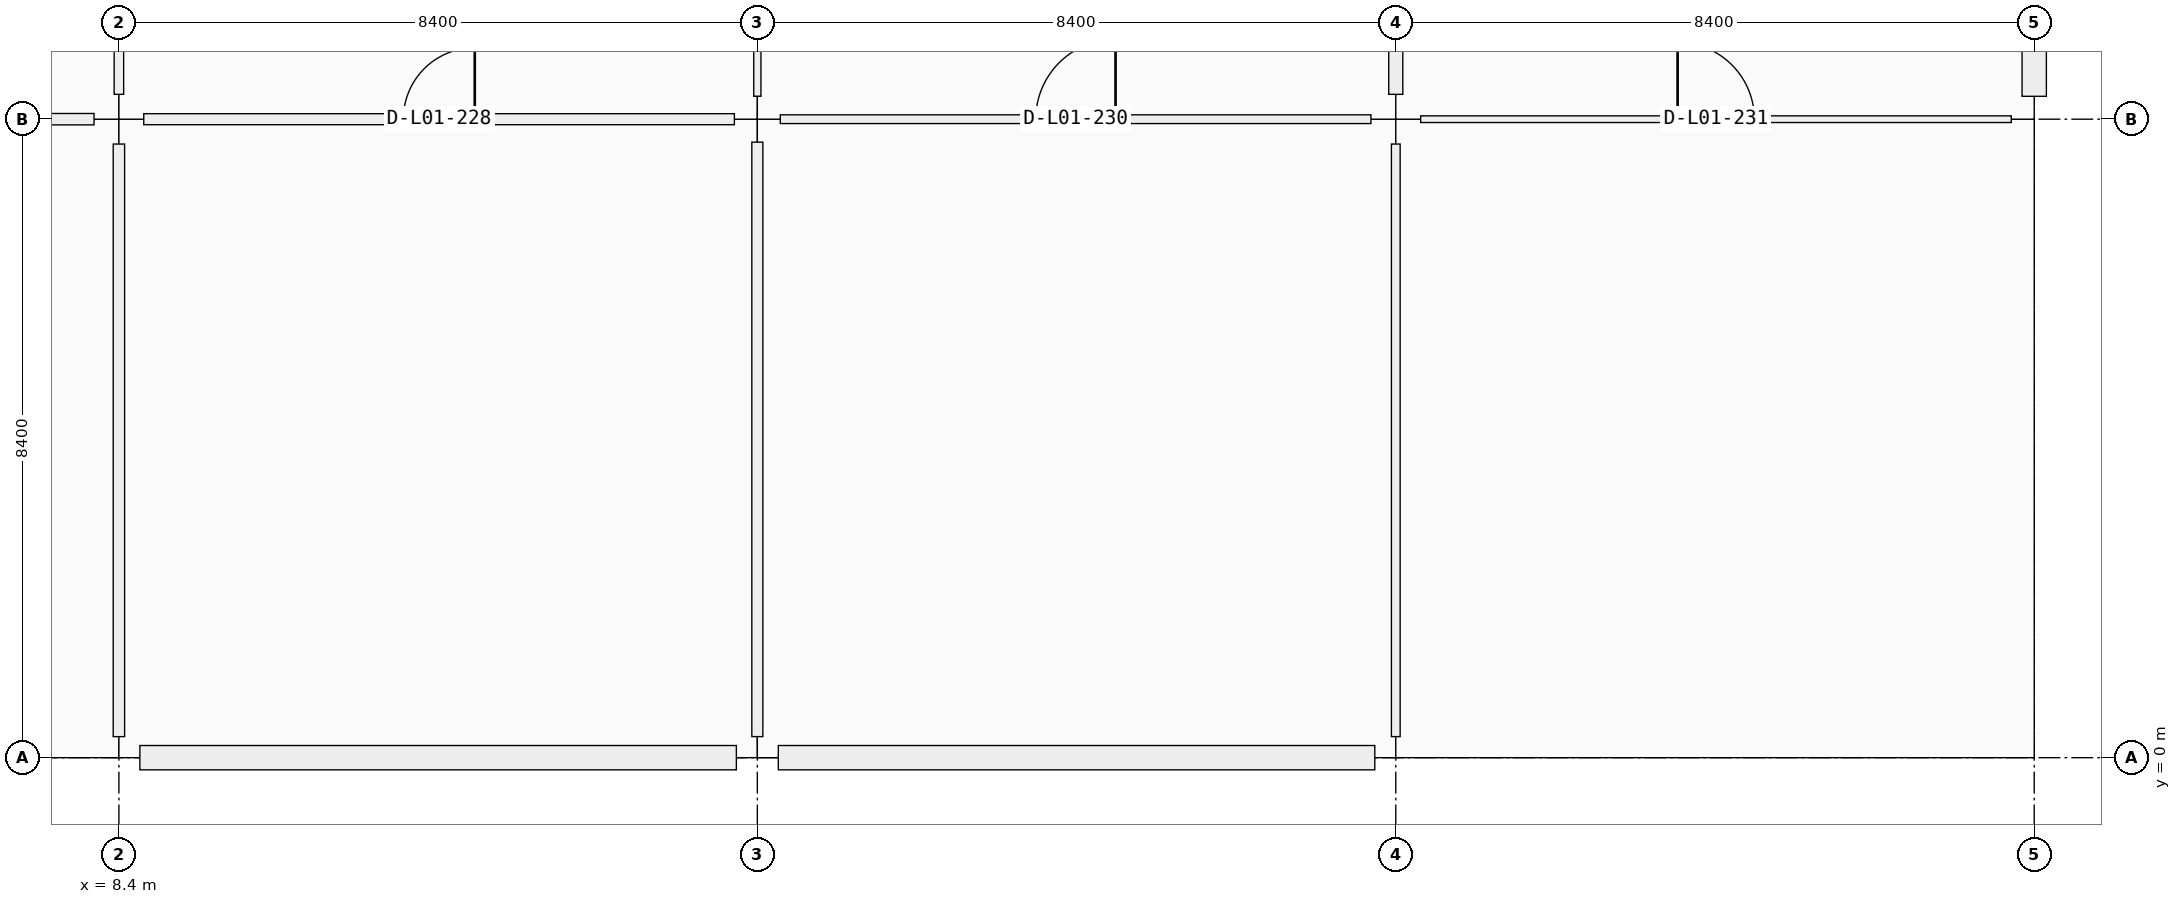
"""IFC4 building model, lengths in metres.
Left out: names, types, materials, properties, quantities, classifications, styles, units other than length and angle.
Written with IfcOpenShell. Run it as: python <this file> out.ifc"""

import sys

from ifc_helpers import new_model, si_unit, direction, frame, frame_2d, origin, origin_2d, place, context, subcontext, project, spatial, rectangle, extrude, element, fill, save


model = new_model("IFC4")
c1 = context("Model", 3, precision=1e-05, world=origin(), true_north=direction((0.0, 1.0)))
c2 = subcontext(c1, "Body", "Model", "MODEL_VIEW")
j1 = project(units=[si_unit("LENGTHUNIT", "METRE"), si_unit("PLANEANGLEUNIT", "RADIAN")], contexts=[c1])
p1 = place(None, origin())
s1 = spatial("IfcSite", under=j1, at=p1, CompositionType="ELEMENT")
p2 = place(p1, origin())
s2 = spatial("IfcBuilding", under=s1, at=p2, CompositionType="ELEMENT")
p3 = place(p2, frame((0.0, 0.0, 5.76)))
s3 = spatial("IfcBuildingStorey", under=s2, at=p3, CompositionType="ELEMENT", Elevation=5.76)
p4 = place(p3, frame((8.4, 0.0, 0.0), z_axis=(0.0, 0.0, 1.0), x_axis=(1.0, 0.0, 0.0)))
e1 = element("IfcColumn", 1, at=p4, inside=s3, PredefinedType="COLUMN", context=c2, shape_type="SweptSolid", body=[
    extrude(rectangle(XDim=0.55, YDim=0.55, at=origin_2d()), origin(), (0.0, 0.0, 1.0), 4.2),
])
p5 = place(p3, frame((8.4, 8.4, 0.0), z_axis=(0.0, 0.0, 1.0), x_axis=(1.0, 0.0, 0.0)))
e2 = element("IfcColumn", 2, at=p5, inside=s3, PredefinedType="COLUMN", context=c2, shape_type="SweptSolid", body=[
    extrude(rectangle(XDim=0.65, YDim=0.65, at=origin_2d()), origin(), (0.0, 0.0, 1.0), 4.5),
])
p6 = place(p3, frame((16.8, 0.0, 0.0), z_axis=(0.0, 0.0, 1.0), x_axis=(1.0, 0.0, 0.0)))
e3 = element("IfcColumn", 3, at=p6, inside=s3, PredefinedType="COLUMN", context=c2, shape_type="SweptSolid", body=[
    extrude(rectangle(XDim=0.55, YDim=0.55, at=origin_2d()), origin(), (0.0, 0.0, 1.0), 4.2),
])
p7 = place(p3, frame((16.8, 8.4, 0.0), z_axis=(0.0, 0.0, 1.0), x_axis=(1.0, 0.0, 0.0)))
e4 = element("IfcColumn", 4, at=p7, inside=s3, PredefinedType="COLUMN", context=c2, shape_type="SweptSolid", body=[
    extrude(rectangle(XDim=0.6, YDim=0.6, at=origin_2d()), origin(), (0.0, 0.0, 1.0), 4.5),
])
p8 = place(p3, frame((25.2, 0.0, 0.0), z_axis=(0.0, 0.0, 1.0), x_axis=(1.0, 0.0, 0.0)))
e5 = element("IfcColumn", 5, at=p8, inside=s3, PredefinedType="COLUMN", context=c2, shape_type="SweptSolid", body=[
    extrude(rectangle(XDim=0.55, YDim=0.55, at=origin_2d()), origin(), (0.0, 0.0, 1.0), 4.2),
])
p9 = place(p3, frame((25.2, 8.4, 0.0), z_axis=(0.0, 0.0, 1.0), x_axis=(1.0, 0.0, 0.0)))
e6 = element("IfcColumn", 6, at=p9, inside=s3, PredefinedType="COLUMN", context=c2, shape_type="SweptSolid", body=[
    extrude(rectangle(XDim=0.65, YDim=0.65, at=origin_2d()), origin(), (0.0, 0.0, 1.0), 4.5),
])
p10 = place(p3, frame((33.6, 0.0, 0.0), z_axis=(0.0, 0.0, 1.0), x_axis=(1.0, 0.0, 0.0)))
e7 = element("IfcColumn", 7, at=p10, inside=s3, PredefinedType="COLUMN", context=c2, shape_type="SweptSolid", body=[
    extrude(rectangle(XDim=0.55, YDim=0.55, at=origin_2d()), origin(), (0.0, 0.0, 1.0), 4.2),
])
p11 = place(p3, frame((33.6, 8.4, 0.0), z_axis=(0.0, 0.0, 1.0), x_axis=(1.0, 0.0, 0.0)))
e8 = element("IfcColumn", 8, at=p11, inside=s3, PredefinedType="COLUMN", context=c2, shape_type="SweptSolid", body=[
    extrude(rectangle(XDim=0.6, YDim=0.6, at=origin_2d()), origin(), (0.0, 0.0, 1.0), 4.5),
])
p12 = place(p3, frame((16.524, 0.0, 0.0), z_axis=(0.0, 0.0, 1.0), x_axis=(-1.0, 0.0, 0.0)))
e9 = element("IfcWall", 9, at=p12, inside=s3, PredefinedType="SOLIDWALL", context=c2, shape_type="SweptSolid", body=[
    extrude(rectangle(XDim=7.848, YDim=0.32, at=frame_2d((3.924, 0.0))), origin(), (0.0, 0.0, 1.0), 3.4),
])
p13 = place(p12, frame((3.249, 0.0, 0.9)))
e10 = element("IfcOpeningElement", 10, at=p13, cuts=e9, PredefinedType="OPENING", context=c2, shape_type="SweptSolid", body=[
    extrude(rectangle(XDim=1.35, YDim=1.5, at=frame_2d((0.675, 0.75))), frame((0.0, 0.16, 0.0), z_axis=(0.0, -1.0, 0.0), x_axis=(1.0, 0.0, 0.0)), (0.0, 0.0, 1.0), 0.32),
])
p14 = place(p3, frame((24.924, 0.0, 0.0), z_axis=(0.0, 0.0, 1.0), x_axis=(-1.0, 0.0, 0.0)))
e11 = element("IfcWall", 11, at=p14, inside=s3, PredefinedType="SOLIDWALL", context=c2, shape_type="SweptSolid", body=[
    extrude(rectangle(XDim=7.848, YDim=0.32, at=frame_2d((3.924, 0.0))), origin(), (0.0, 0.0, 1.0), 3.4),
])
p15 = place(p14, frame((3.374, 0.0, 0.9)))
e12 = element("IfcOpeningElement", 12, at=p15, cuts=e11, PredefinedType="OPENING", context=c2, shape_type="SweptSolid", body=[
    extrude(rectangle(XDim=1.1, YDim=1.5, at=frame_2d((0.55, 0.75))), frame((0.0, 0.16, 0.0), z_axis=(0.0, -1.0, 0.0), x_axis=(1.0, 0.0, 0.0)), (0.0, 0.0, 1.0), 0.32),
])
p16 = place(p3, frame((33.6, 16.399, 0.0), z_axis=(0.0, 0.0, 1.0), x_axis=(0.0, -1.0, 0.0)))
e13 = element("IfcWall", 13, at=p16, inside=s3, PredefinedType="SOLIDWALL", context=c2, shape_type="SweptSolid", body=[
    extrude(rectangle(XDim=7.698, YDim=0.32, at=frame_2d((3.849, 0.0))), origin(), (0.0, 0.0, 1.0), 3.4),
])
p17 = place(p16, frame((2.699, 0.0, 0.9)))
e14 = element("IfcOpeningElement", 14, at=p17, cuts=e13, PredefinedType="OPENING", context=c2, shape_type="SweptSolid", body=[
    extrude(rectangle(XDim=2.3, YDim=1.85, at=frame_2d((1.15, 0.925))), frame((0.0, 0.16, 0.0), z_axis=(0.0, -1.0, 0.0), x_axis=(1.0, 0.0, 0.0)), (0.0, 0.0, 1.0), 0.32),
])
p18 = place(p3, frame((0.277, 8.4, 0.0), z_axis=(0.0, 0.0, 1.0), x_axis=(1.0, 0.0, 0.0)))
e15 = element("IfcWall", 15, at=p18, inside=s3, PredefinedType="MOVABLE", context=c2, shape_type="SweptSolid", body=[
    extrude(rectangle(XDim=7.796, YDim=0.15, at=frame_2d((3.898, 0.0))), origin(), (0.0, 0.0, 1.0), 2.4),
])
p19 = place(p18, frame((3.358, 0.0, 0.0)))
e16 = element("IfcOpeningElement", 16, at=p19, cuts=e15, PredefinedType="OPENING", context=c2, shape_type="SweptSolid", body=[
    extrude(rectangle(XDim=1.08, YDim=2.22, at=frame_2d((0.54, 1.11))), frame((0.0, 0.075, 0.0), z_axis=(0.0, -1.0, 0.0), x_axis=(1.0, 0.0, 0.0)), (0.0, 0.0, 1.0), 0.15),
])
p20 = place(p3, frame((8.727, 8.4, 0.0), z_axis=(0.0, 0.0, 1.0), x_axis=(1.0, 0.0, 0.0)))
e17 = element("IfcWall", 17, at=p20, inside=s3, PredefinedType="PARTITIONING", context=c2, shape_type="SweptSolid", body=[
    extrude(rectangle(XDim=7.771, YDim=0.145, at=frame_2d((3.885, 0.0))), origin(), (0.0, 0.0, 1.0), 2.4),
])
p21 = place(p20, frame((3.415, 0.0, 0.0)))
e18 = element("IfcOpeningElement", 18, at=p21, cuts=e17, PredefinedType="OPENING", context=c2, shape_type="SweptSolid", body=[
    extrude(rectangle(XDim=0.94, YDim=2.15, at=frame_2d((0.47, 1.075))), frame((0.0, 0.073, 0.0), z_axis=(0.0, -1.0, 0.0), x_axis=(1.0, 0.0, 0.0)), (0.0, 0.0, 1.0), 0.145),
])
p22 = place(p3, frame((17.102, 8.4, 0.0), z_axis=(0.0, 0.0, 1.0), x_axis=(1.0, 0.0, 0.0)))
e19 = element("IfcWall", 19, at=p22, inside=s3, PredefinedType="PARTITIONING", context=c2, shape_type="SweptSolid", body=[
    extrude(rectangle(XDim=7.771, YDim=0.115, at=frame_2d((3.885, 0.0))), origin(), (0.0, 0.0, 1.0), 2.4),
])
p23 = place(p22, frame((3.361, 0.0, 0.0)))
e20 = element("IfcOpeningElement", 20, at=p23, cuts=e19, PredefinedType="OPENING", context=c2, shape_type="SweptSolid", body=[
    extrude(rectangle(XDim=1.05, YDim=2.12, at=frame_2d((0.525, 1.06))), frame((0.0, 0.058, 0.0), z_axis=(0.0, -1.0, 0.0), x_axis=(1.0, 0.0, 0.0)), (0.0, 0.0, 1.0), 0.115),
])
p24 = place(p3, frame((25.527, 8.4, 0.0), z_axis=(0.0, 0.0, 1.0), x_axis=(1.0, 0.0, 0.0)))
e21 = element("IfcWall", 21, at=p24, inside=s3, PredefinedType="PARTITIONING", context=c2, shape_type="SweptSolid", body=[
    extrude(rectangle(XDim=7.771, YDim=0.088, at=frame_2d((3.885, 0.0))), origin(), (0.0, 0.0, 1.0), 2.4),
])
p25 = place(p24, frame((3.381, 0.0, 0.0)))
e22 = element("IfcOpeningElement", 22, at=p25, cuts=e21, PredefinedType="OPENING", context=c2, shape_type="SweptSolid", body=[
    extrude(rectangle(XDim=1.01, YDim=2.12, at=frame_2d((0.505, 1.06))), frame((0.0, 0.044, 0.0), z_axis=(0.0, -1.0, 0.0), x_axis=(1.0, 0.0, 0.0)), (0.0, 0.0, 1.0), 0.088),
])
p26 = place(p3, frame((8.4, 0.277, 0.0), z_axis=(0.0, 0.0, 1.0), x_axis=(0.0, 1.0, 0.0)))
e23 = element("IfcWall", 23, at=p26, inside=s3, PredefinedType="MOVABLE", context=c2, shape_type="SweptSolid", body=[
    extrude(rectangle(XDim=7.796, YDim=0.15, at=frame_2d((3.898, 0.0))), origin(), (0.0, 0.0, 1.0), 2.4),
])
p27 = place(p26, frame((3.388, 0.0, 0.0)))
e24 = element("IfcOpeningElement", 24, at=p27, cuts=e23, PredefinedType="OPENING", context=c2, shape_type="SweptSolid", body=[
    extrude(rectangle(XDim=1.02, YDim=2.2, at=frame_2d((0.51, 1.1))), frame((0.0, 0.075, 0.0), z_axis=(0.0, -1.0, 0.0), x_axis=(1.0, 0.0, 0.0)), (0.0, 0.0, 1.0), 0.15),
])
p28 = place(p3, frame((8.4, 8.727, 0.0), z_axis=(0.0, 0.0, 1.0), x_axis=(0.0, 1.0, 0.0)))
e25 = element("IfcWall", 25, at=p28, inside=s3, PredefinedType="PARTITIONING", context=c2, shape_type="SweptSolid", body=[
    extrude(rectangle(XDim=7.671, YDim=0.125, at=frame_2d((3.835, 0.0))), origin(), (0.0, 0.0, 1.0), 2.4),
])
p29 = place(p28, frame((3.336, 0.0, 0.0)))
e26 = element("IfcOpeningElement", 26, at=p29, cuts=e25, PredefinedType="OPENING", context=c2, shape_type="SweptSolid", body=[
    extrude(rectangle(XDim=1.0, YDim=2.2, at=frame_2d((0.5, 1.1))), frame((0.0, 0.062, 0.0), z_axis=(0.0, -1.0, 0.0), x_axis=(1.0, 0.0, 0.0)), (0.0, 0.0, 1.0), 0.125),
])
p30 = place(p3, frame((16.8, 0.277, 0.0), z_axis=(0.0, 0.0, 1.0), x_axis=(0.0, 1.0, 0.0)))
e27 = element("IfcWall", 27, at=p30, inside=s3, PredefinedType="PARTITIONING", context=c2, shape_type="SweptSolid", body=[
    extrude(rectangle(XDim=7.821, YDim=0.145, at=frame_2d((3.91, 0.0))), origin(), (0.0, 0.0, 1.0), 2.4),
])
p31 = place(p30, frame((3.45, 0.0, 0.0)))
e28 = element("IfcOpeningElement", 28, at=p31, cuts=e27, PredefinedType="OPENING", context=c2, shape_type="SweptSolid", body=[
    extrude(rectangle(XDim=0.92, YDim=2.15, at=frame_2d((0.46, 1.075))), frame((0.0, 0.073, 0.0), z_axis=(0.0, -1.0, 0.0), x_axis=(1.0, 0.0, 0.0)), (0.0, 0.0, 1.0), 0.145),
])
p32 = place(p3, frame((16.8, 8.702, 0.0), z_axis=(0.0, 0.0, 1.0), x_axis=(0.0, 1.0, 0.0)))
e29 = element("IfcWall", 29, at=p32, inside=s3, PredefinedType="PARTITIONING", context=c2, shape_type="SweptSolid", body=[
    extrude(rectangle(XDim=7.696, YDim=0.095, at=frame_2d((3.848, 0.0))), origin(), (0.0, 0.0, 1.0), 2.4),
])
p33 = place(p32, frame((3.323, 0.0, 0.0)))
e30 = element("IfcOpeningElement", 30, at=p33, cuts=e29, PredefinedType="OPENING", context=c2, shape_type="SweptSolid", body=[
    extrude(rectangle(XDim=1.05, YDim=2.12, at=frame_2d((0.525, 1.06))), frame((0.0, 0.047, 0.0), z_axis=(0.0, -1.0, 0.0), x_axis=(1.0, 0.0, 0.0)), (0.0, 0.0, 1.0), 0.095),
])
p34 = place(p3, frame((25.2, 0.277, 0.0), z_axis=(0.0, 0.0, 1.0), x_axis=(0.0, 1.0, 0.0)))
e31 = element("IfcWall", 31, at=p34, inside=s3, PredefinedType="PARTITIONING", context=c2, shape_type="SweptSolid", body=[
    extrude(rectangle(XDim=7.796, YDim=0.115, at=frame_2d((3.898, 0.0))), origin(), (0.0, 0.0, 1.0), 2.4),
])
p35 = place(p34, frame((3.358, 0.0, 0.0)))
e32 = element("IfcOpeningElement", 32, at=p35, cuts=e31, PredefinedType="OPENING", context=c2, shape_type="SweptSolid", body=[
    extrude(rectangle(XDim=1.08, YDim=2.22, at=frame_2d((0.54, 1.11))), frame((0.0, 0.058, 0.0), z_axis=(0.0, -1.0, 0.0), x_axis=(1.0, 0.0, 0.0)), (0.0, 0.0, 1.0), 0.115),
])
p36 = place(p3, frame((25.2, 8.727, 0.0), z_axis=(0.0, 0.0, 1.0), x_axis=(0.0, 1.0, 0.0)))
e33 = element("IfcWall", 33, at=p36, inside=s3, PredefinedType="PARTITIONING", context=c2, shape_type="SweptSolid", body=[
    extrude(rectangle(XDim=7.671, YDim=0.185, at=frame_2d((3.835, 0.0))), origin(), (0.0, 0.0, 1.0), 2.4),
])
p37 = place(p36, frame((3.306, 0.0, 0.0)))
e34 = element("IfcOpeningElement", 34, at=p37, cuts=e33, PredefinedType="OPENING", context=c2, shape_type="SweptSolid", body=[
    extrude(rectangle(XDim=1.06, YDim=2.22, at=frame_2d((0.53, 1.11))), frame((0.0, 0.093, 0.0), z_axis=(0.0, -1.0, 0.0), x_axis=(1.0, 0.0, 0.0)), (0.0, 0.0, 1.0), 0.185),
])
p38 = place(p13, origin())
e35 = element("IfcWindow", 35, at=p38, inside=s3, PartitioningType="SINGLE_PANEL", PredefinedType="WINDOW", context=c2, shape_type="SweptSolid", body=[
    extrude(rectangle(XDim=1.35, YDim=1.5, at=frame_2d((0.675, 0.75))), frame((0.0, 0.03, 0.0), z_axis=(0.0, -1.0, 0.0), x_axis=(1.0, 0.0, 0.0)), (0.0, 0.0, 1.0), 0.06),
])
fill(e10, e35)
p39 = place(p15, origin())
e36 = element("IfcWindow", 36, at=p39, inside=s3, PartitioningType="SINGLE_PANEL", PredefinedType="WINDOW", context=c2, shape_type="SweptSolid", body=[
    extrude(rectangle(XDim=1.1, YDim=1.5, at=frame_2d((0.55, 0.75))), frame((0.0, 0.03, 0.0), z_axis=(0.0, -1.0, 0.0), x_axis=(1.0, 0.0, 0.0)), (0.0, 0.0, 1.0), 0.06),
])
fill(e12, e36)
p40 = place(p21, origin())
e37 = element("IfcDoor", 37, at=p40, inside=s3, OperationType="SINGLE_SWING_RIGHT", PredefinedType="DOOR", context=c2, shape_type="SweptSolid", body=[
    extrude(rectangle(XDim=0.94, YDim=2.15, at=frame_2d((0.47, 1.075))), frame((0.0, 0.025, 0.0), z_axis=(0.0, -1.0, 0.0), x_axis=(1.0, 0.0, 0.0)), (0.0, 0.0, 1.0), 0.05),
])
fill(e18, e37)
p41 = place(p23, origin())
e38 = element("IfcDoor", 38, at=p41, inside=s3, OperationType="SINGLE_SWING_RIGHT", PredefinedType="DOOR", context=c2, shape_type="SweptSolid", body=[
    extrude(rectangle(XDim=1.05, YDim=2.12, at=frame_2d((0.525, 1.06))), frame((0.0, 0.025, 0.0), z_axis=(0.0, -1.0, 0.0), x_axis=(1.0, 0.0, 0.0)), (0.0, 0.0, 1.0), 0.05),
])
fill(e20, e38)
p42 = place(p25, origin())
e39 = element("IfcDoor", 39, at=p42, inside=s3, OperationType="SINGLE_SWING_LEFT", PredefinedType="DOOR", context=c2, shape_type="SweptSolid", body=[
    extrude(rectangle(XDim=1.01, YDim=2.12, at=frame_2d((0.505, 1.06))), frame((0.0, 0.025, 0.0), z_axis=(0.0, -1.0, 0.0), x_axis=(1.0, 0.0, 0.0)), (0.0, 0.0, 1.0), 0.05),
])
fill(e22, e39)
p43 = place(p27, origin())
e40 = element("IfcDoor", 40, at=p43, inside=s3, OperationType="SINGLE_SWING_RIGHT", PredefinedType="DOOR", context=c2, shape_type="SweptSolid", body=[
    extrude(rectangle(XDim=1.02, YDim=2.2, at=frame_2d((0.51, 1.1))), frame((0.0, 0.025, 0.0), z_axis=(0.0, -1.0, 0.0), x_axis=(1.0, 0.0, 0.0)), (0.0, 0.0, 1.0), 0.05),
])
fill(e24, e40)
p44 = place(p31, origin())
e41 = element("IfcDoor", 41, at=p44, inside=s3, OperationType="SINGLE_SWING_LEFT", PredefinedType="DOOR", context=c2, shape_type="SweptSolid", body=[
    extrude(rectangle(XDim=0.92, YDim=2.15, at=frame_2d((0.46, 1.075))), frame((0.0, 0.025, 0.0), z_axis=(0.0, -1.0, 0.0), x_axis=(1.0, 0.0, 0.0)), (0.0, 0.0, 1.0), 0.05),
])
fill(e28, e41)
p45 = place(p35, origin())
e42 = element("IfcDoor", 42, at=p45, inside=s3, OperationType="SINGLE_SWING_RIGHT", PredefinedType="DOOR", context=c2, shape_type="SweptSolid", body=[
    extrude(rectangle(XDim=1.08, YDim=2.22, at=frame_2d((0.54, 1.11))), frame((0.0, 0.025, 0.0), z_axis=(0.0, -1.0, 0.0), x_axis=(1.0, 0.0, 0.0)), (0.0, 0.0, 1.0), 0.05),
])
fill(e32, e42)
save(model, sys.argv[1])
